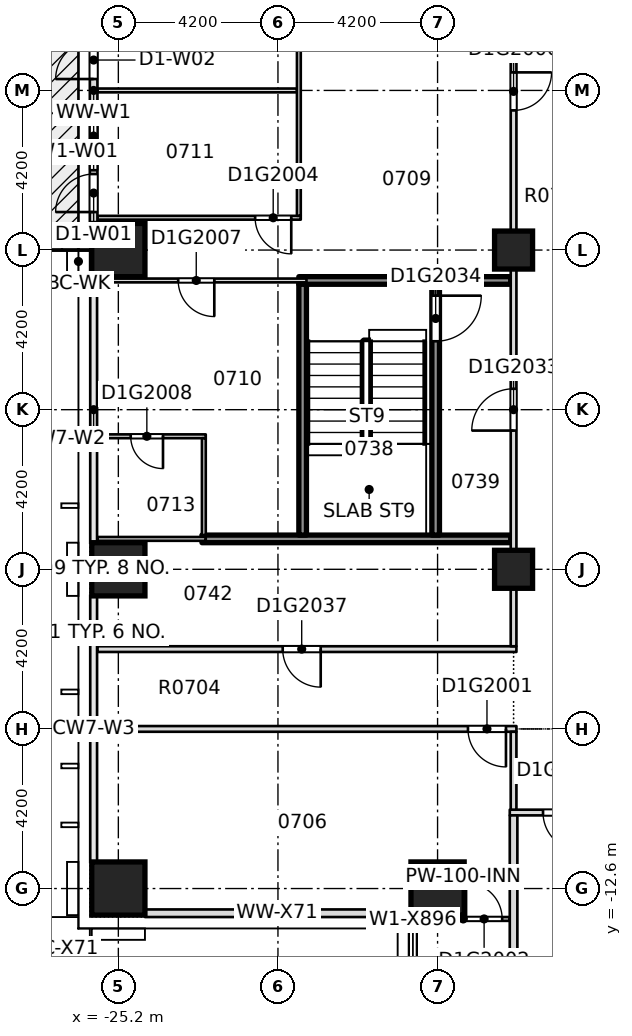
"""IFC4 building model, lengths in metres.
Left out: names, types, materials, properties, quantities, classifications, styles, units other than length and angle.
Written with IfcOpenShell. Run it as: python <this file> out.ifc"""

import sys

from ifc_helpers import new_model, si_unit, direction, frame, frame_2d, origin, origin_2d, place, context, subcontext, project, spatial, rectangle, extrude, element, fill, save


model = new_model("IFC4")
c1 = context("Model", 3, precision=1e-05, world=origin(), true_north=direction((0.0, 1.0)))
c2 = subcontext(c1, "Body", "Model", "MODEL_VIEW")
j1 = project(units=[si_unit("LENGTHUNIT", "METRE"), si_unit("PLANEANGLEUNIT", "RADIAN")], contexts=[c1])
p1 = place(None, origin())
s1 = spatial("IfcSite", under=j1, at=p1, CompositionType="ELEMENT")
p2 = place(p1, origin())
s2 = spatial("IfcBuilding", under=s1, at=p2, CompositionType="ELEMENT")
p3 = place(p2, frame((0.0, 0.0, 37.95)))
s3 = spatial("IfcBuildingStorey", under=s2, at=p3, CompositionType="ELEMENT", Elevation=37.95)
for number, where, z_axis, x_axis in (
    (1, (-25.2, -12.6, -0.32), (0.0, 0.0, 1.0), (1.0, 0.0, 0.0)),
    (2, (-16.8, -12.6, -0.32), (0.0, 0.0, 1.0), (1.0, 0.0, 0.0)),
    (3, (-25.2, -4.2, -0.32), (0.0, 0.0, 1.0), (1.0, 0.0, 0.0)),
    (4, (-25.2, 4.2, -0.32), (0.0, 0.0, 1.0), (1.0, 0.0, 0.0)),
):
    element("IfcColumn", number, at=place(p3, frame(where, z_axis=z_axis, x_axis=x_axis)), inside=s3, PredefinedType="COLUMN", context=c2, shape_type="SweptSolid", body=[
        extrude(rectangle(XDim=1.4, YDim=1.4, at=origin_2d()), origin(), (0.0, 0.0, 1.0), 3.45),
    ])
for number, where, z_axis, x_axis in (
    (5, (-14.8, -4.2, -0.32), (0.0, 0.0, 1.0), (1.0, 0.0, 0.0)),
    (6, (-14.8, 4.2, -0.32), (0.0, 0.0, 1.0), (1.0, 0.0, 0.0)),
):
    element("IfcColumn", number, at=place(p3, frame(where, z_axis=z_axis, x_axis=x_axis)), inside=s3, PredefinedType="COLUMN", context=c2, shape_type="SweptSolid", body=[
        extrude(rectangle(XDim=1.0, YDim=1.0, at=origin_2d()), origin(), (0.0, 0.0, 1.0), 3.45),
    ])
p4 = place(p3, frame((-17.35, -13.4, 0.0), z_axis=(0.0, 0.0, 1.0), x_axis=(1.0, 0.0, 0.0)))
e7 = element("IfcWall", 7, at=p4, inside=s3, PredefinedType="PARTITIONING", context=c2, shape_type="SweptSolid", body=[
    extrude(rectangle(XDim=2.45, YDim=0.1, at=frame_2d((1.225, 0.0))), origin(), (0.0, 0.0, 1.0), 3.13),
])
p5 = place(p4, frame((1.3, 0.0, 0.0)))
e8 = element("IfcOpeningElement", 8, at=p5, cuts=e7, PredefinedType="OPENING", context=c2, shape_type="SweptSolid", body=[
    extrude(rectangle(XDim=0.95, YDim=2.1, at=frame_2d((0.475, 1.05))), frame((0.0, 0.06, 0.0), z_axis=(0.0, -1.0, 0.0), x_axis=(1.0, 0.0, 0.0)), (0.0, 0.0, 1.0), 0.12),
])
p6 = place(p3, frame((-14.9, -10.6, 0.0), z_axis=(0.0, 0.0, 1.0), x_axis=(1.0, 0.0, 0.0)))
e9 = element("IfcWall", 9, at=p6, inside=s3, PredefinedType="PARTITIONING", context=c2, shape_type="SweptSolid", body=[
    extrude(rectangle(XDim=6.4, YDim=0.15, at=frame_2d((3.2, 0.0))), origin(), (0.0, 0.0, 1.0), 3.13),
])
p7 = place(p6, frame((3.95, 0.0, 0.0)))
e10 = element("IfcOpeningElement", 10, at=p7, cuts=e9, PredefinedType="OPENING", context=c2, shape_type="SweptSolid", body=[
    extrude(rectangle(XDim=1.1, YDim=2.1, at=frame_2d((0.55, 1.05))), frame((0.0, 0.085, 0.0), z_axis=(0.0, -1.0, 0.0), x_axis=(1.0, 0.0, 0.0)), (0.0, 0.0, 1.0), 0.17),
])
p8 = place(p6, frame((0.875, 0.0, 0.0)))
e11 = element("IfcOpeningElement", 11, at=p8, cuts=e9, PredefinedType="OPENING", context=c2, shape_type="SweptSolid", body=[
    extrude(rectangle(XDim=1.0, YDim=2.1, at=frame_2d((0.5, 1.05))), frame((0.0, 0.085, 0.0), z_axis=(0.0, -1.0, 0.0), x_axis=(1.0, 0.0, 0.0)), (0.0, 0.0, 1.0), 0.17),
])
p9 = place(p3, frame((-25.75, -8.4, 0.0), z_axis=(0.0, 0.0, 1.0), x_axis=(1.0, 0.0, 0.0)))
e12 = element("IfcWall", 12, at=p9, inside=s3, PredefinedType="PARTITIONING", context=c2, shape_type="SweptSolid", body=[
    extrude(rectangle(XDim=11.025, YDim=0.15, at=frame_2d((5.512, 0.0))), origin(), (0.0, 0.0, 1.0), 3.13),
])
p10 = place(p9, frame((9.75, 0.0, 0.0)))
e13 = element("IfcOpeningElement", 13, at=p10, cuts=e12, PredefinedType="OPENING", context=c2, shape_type="SweptSolid", body=[
    extrude(rectangle(XDim=1.0, YDim=2.1, at=frame_2d((0.5, 1.05))), frame((0.0, 0.085, 0.0), z_axis=(0.0, -1.0, 0.0), x_axis=(1.0, 0.0, 0.0)), (0.0, 0.0, 1.0), 0.17),
])
p11 = place(p3, frame((-25.75, -6.3, 0.0), z_axis=(0.0, 0.0, 1.0), x_axis=(1.0, 0.0, 0.0)))
e14 = element("IfcWall", 14, at=p11, inside=s3, PredefinedType="PARTITIONING", context=c2, shape_type="SweptSolid", body=[
    extrude(rectangle(XDim=11.025, YDim=0.15, at=frame_2d((5.512, 0.0))), origin(), (0.0, 0.0, 1.0), 3.13),
])
p12 = place(p11, frame((4.875, 0.0, 0.0)))
e15 = element("IfcOpeningElement", 15, at=p12, cuts=e14, PredefinedType="OPENING", context=c2, shape_type="SweptSolid", body=[
    extrude(rectangle(XDim=1.0, YDim=2.1, at=frame_2d((0.5, 1.05))), frame((0.0, 0.085, 0.0), z_axis=(0.0, -1.0, 0.0), x_axis=(1.0, 0.0, 0.0)), (0.0, 0.0, 1.0), 0.17),
])
p13 = place(p3, frame((-25.75, -3.4, 0.0), z_axis=(0.0, 0.0, 1.0), x_axis=(1.0, 0.0, 0.0)))
e16 = element("IfcWall", 16, at=p13, inside=s3, PredefinedType="PARTITIONING", context=c2, shape_type="SweptSolid", body=[
    extrude(rectangle(XDim=2.85, YDim=0.1, at=frame_2d((1.425, 0.0))), origin(), (0.0, 0.0, 1.0), 3.13),
])
p14 = place(p3, frame((-23.0, -3.4, 0.0), z_axis=(0.0, 0.0, 1.0), x_axis=(1.0, 0.0, 0.0)))
e17 = element("IfcWall", 17, at=p14, inside=s3, PredefinedType="SOLIDWALL", context=c2, shape_type="SweptSolid", body=[
    extrude(rectangle(XDim=8.125, YDim=0.2, at=frame_2d((4.062, 0.0))), origin(), (0.0, 0.0, 1.0), 3.13),
])
p15 = place(p3, frame((-25.75, -0.7, 0.0), z_axis=(0.0, 0.0, 1.0), x_axis=(1.0, 0.0, 0.0)))
e18 = element("IfcWall", 18, at=p15, inside=s3, PredefinedType="PARTITIONING", context=c2, shape_type="SweptSolid", body=[
    extrude(rectangle(XDim=2.85, YDim=0.1, at=frame_2d((1.425, 0.0))), origin(), (0.0, 0.0, 1.0), 3.13),
])
p16 = place(p15, frame((0.875, 0.0, 0.0)))
e19 = element("IfcOpeningElement", 19, at=p16, cuts=e18, PredefinedType="OPENING", context=c2, shape_type="SweptSolid", body=[
    extrude(rectangle(XDim=0.85, YDim=2.1, at=frame_2d((0.425, 1.05))), frame((0.0, 0.06, 0.0), z_axis=(0.0, -1.0, 0.0), x_axis=(1.0, 0.0, 0.0)), (0.0, 0.0, 1.0), 0.12),
])
p17 = place(p3, frame((-25.75, 3.4, 0.0), z_axis=(0.0, 0.0, 1.0), x_axis=(1.0, 0.0, 0.0)))
e20 = element("IfcWall", 20, at=p17, inside=s3, PredefinedType="PARTITIONING", context=c2, shape_type="SweptSolid", body=[
    extrude(rectangle(XDim=5.5, YDim=0.1, at=frame_2d((2.75, 0.0))), origin(), (0.0, 0.0, 1.0), 3.13),
])
p18 = place(p17, frame((2.125, 0.0, 0.0)))
e21 = element("IfcOpeningElement", 21, at=p18, cuts=e20, PredefinedType="OPENING", context=c2, shape_type="SweptSolid", body=[
    extrude(rectangle(XDim=0.95, YDim=2.1, at=frame_2d((0.475, 1.05))), frame((0.0, 0.06, 0.0), z_axis=(0.0, -1.0, 0.0), x_axis=(1.0, 0.0, 0.0)), (0.0, 0.0, 1.0), 0.12),
])
p19 = place(p3, frame((-20.45, 3.4, 0.0), z_axis=(0.0, 0.0, 1.0), x_axis=(1.0, 0.0, 0.0)))
e22 = element("IfcWall", 22, at=p19, inside=s3, PredefinedType="SOLIDWALL", context=c2, shape_type="SweptSolid", body=[
    extrude(rectangle(XDim=5.575, YDim=0.2, at=frame_2d((2.788, 0.0))), origin(), (0.0, 0.0, 1.0), 3.13),
])
p20 = place(p3, frame((-25.75, 5.05, 0.0), z_axis=(0.0, 0.0, 1.0), x_axis=(1.0, 0.0, 0.0)))
e23 = element("IfcWall", 23, at=p20, inside=s3, PredefinedType="PARTITIONING", context=c2, shape_type="SweptSolid", body=[
    extrude(rectangle(XDim=5.35, YDim=0.1, at=frame_2d((2.675, 0.0))), origin(), (0.0, 0.0, 1.0), 3.13),
])
p21 = place(p20, frame((4.15, 0.0, 0.0)))
e24 = element("IfcOpeningElement", 24, at=p21, cuts=e23, PredefinedType="OPENING", context=c2, shape_type="SweptSolid", body=[
    extrude(rectangle(XDim=0.95, YDim=2.1, at=frame_2d((0.475, 1.05))), frame((0.0, 0.06, 0.0), z_axis=(0.0, -1.0, 0.0), x_axis=(1.0, 0.0, 0.0)), (0.0, 0.0, 1.0), 0.12),
])
p22 = place(p3, frame((-25.75, 8.4, 0.0), z_axis=(0.0, 0.0, 1.0), x_axis=(1.0, 0.0, 0.0)))
e25 = element("IfcWall", 25, at=p22, inside=s3, PredefinedType="PARTITIONING", context=c2, shape_type="SweptSolid", body=[
    extrude(rectangle(XDim=5.25, YDim=0.1, at=frame_2d((2.625, 0.0))), origin(), (0.0, 0.0, 1.0), 3.13),
])
p23 = place(p3, frame((-22.95, -3.3, 0.0), z_axis=(0.0, 0.0, 1.0), x_axis=(0.0, 1.0, 0.0)))
e26 = element("IfcWall", 26, at=p23, inside=s3, PredefinedType="PARTITIONING", context=c2, shape_type="SweptSolid", body=[
    extrude(rectangle(XDim=2.55, YDim=0.1, at=frame_2d((1.275, 0.0))), origin(), (0.0, 0.0, 1.0), 3.13),
])
p24 = place(p3, frame((-20.45, 5.1, 0.0), z_axis=(0.0, 0.0, 1.0), x_axis=(0.0, 1.0, 0.0)))
e27 = element("IfcWall", 27, at=p24, inside=s3, PredefinedType="PARTITIONING", context=c2, shape_type="SweptSolid", body=[
    extrude(rectangle(XDim=8.05, YDim=0.1, at=frame_2d((4.025, 0.0))), origin(), (0.0, 0.0, 1.0), 3.13),
])
p25 = place(p24, frame((4.6, 0.0, 0.0)))
e28 = element("IfcOpeningElement", 28, at=p25, cuts=e27, PredefinedType="OPENING", context=c2, shape_type="SweptSolid", body=[
    extrude(rectangle(XDim=0.95, YDim=2.1, at=frame_2d((0.475, 1.05))), frame((0.0, 0.06, 0.0), z_axis=(0.0, -1.0, 0.0), x_axis=(1.0, 0.0, 0.0)), (0.0, 0.0, 1.0), 0.12),
])
p26 = place(p3, frame((-16.85, -3.3, 0.0), z_axis=(0.0, 0.0, 1.0), x_axis=(0.0, 1.0, 0.0)))
e29 = element("IfcWall", 29, at=p26, inside=s3, PredefinedType="SOLIDWALL", context=c2, shape_type="SweptSolid", body=[
    extrude(rectangle(XDim=6.6, YDim=0.2, at=frame_2d((3.3, 0.0))), origin(), (0.0, 0.0, 1.0), 3.13),
])
p27 = place(p26, frame((5.1, 0.0, 0.0)))
e30 = element("IfcOpeningElement", 30, at=p27, cuts=e29, PredefinedType="OPENING", context=c2, shape_type="SweptSolid", body=[
    extrude(rectangle(XDim=1.2, YDim=2.1, at=frame_2d((0.6, 1.05))), frame((0.0, 0.11, 0.0), z_axis=(0.0, -1.0, 0.0), x_axis=(1.0, 0.0, 0.0)), (0.0, 0.0, 1.0), 0.22),
])
p28 = place(p3, frame((-14.8, -18.7, 0.0), z_axis=(0.0, 0.0, 1.0), x_axis=(0.0, 1.0, 0.0)))
e31 = element("IfcWall", 31, at=p28, inside=s3, PredefinedType="PARTITIONING", context=c2, shape_type="SweptSolid", body=[
    extrude(rectangle(XDim=8.025, YDim=0.2, at=frame_2d((4.012, 0.0))), origin(), (0.0, 0.0, 1.0), 3.13),
])
p29 = place(p3, frame((-14.8, -10.525, 0.0), z_axis=(0.0, 0.0, 1.0), x_axis=(0.0, 1.0, 0.0)))
e32 = element("IfcWall", 32, at=p29, inside=s3, PredefinedType="PARTITIONING", context=c2, shape_type="SweptSolid", body=[
    extrude(rectangle(XDim=2.05, YDim=0.15, at=frame_2d((1.025, 0.0))), origin(), (0.0, 0.0, 1.0), 3.13),
])
p30 = place(p3, frame((-14.8, -6.225, 0.0), z_axis=(0.0, 0.0, 1.0), x_axis=(0.0, 1.0, 0.0)))
e33 = element("IfcWall", 33, at=p30, inside=s3, PredefinedType="PARTITIONING", context=c2, shape_type="SweptSolid", body=[
    extrude(rectangle(XDim=27.775, YDim=0.15, at=frame_2d((13.888, 0.0))), origin(), (0.0, 0.0, 1.0), 3.13),
])
p31 = place(p30, frame((14.1, 0.0, 0.0)))
e34 = element("IfcOpeningElement", 34, at=p31, cuts=e33, PredefinedType="OPENING", context=c2, shape_type="SweptSolid", body=[
    extrude(rectangle(XDim=1.0, YDim=2.1, at=frame_2d((0.5, 1.05))), frame((0.0, 0.085, 0.0), z_axis=(0.0, -1.0, 0.0), x_axis=(1.0, 0.0, 0.0)), (0.0, 0.0, 1.0), 0.17),
])
p32 = place(p30, frame((21.175, 0.0, 0.0)))
e35 = element("IfcOpeningElement", 35, at=p32, cuts=e33, PredefinedType="OPENING", context=c2, shape_type="SweptSolid", body=[
    extrude(rectangle(XDim=0.95, YDim=2.1, at=frame_2d((0.475, 1.05))), frame((0.0, 0.085, 0.0), z_axis=(0.0, -1.0, 0.0), x_axis=(1.0, 0.0, 0.0)), (0.0, 0.0, 1.0), 0.17),
])
p33 = place(p30, frame((25.075, 0.0, 0.0)))
e36 = element("IfcOpeningElement", 36, at=p33, cuts=e33, PredefinedType="OPENING", context=c2, shape_type="SweptSolid", body=[
    extrude(rectangle(XDim=0.95, YDim=2.1, at=frame_2d((0.475, 1.05))), frame((0.0, 0.085, 0.0), z_axis=(0.0, -1.0, 0.0), x_axis=(1.0, 0.0, 0.0)), (0.0, 0.0, 1.0), 0.17),
])
p34 = place(p30, frame((5.675, 0.0, 0.0)))
e37 = element("IfcOpeningElement", 37, at=p34, cuts=e33, PredefinedType="OPENING", context=c2, shape_type="SweptSolid", body=[
    extrude(rectangle(XDim=1.1, YDim=2.1, at=frame_2d((0.55, 1.05))), frame((0.0, 0.085, 0.0), z_axis=(0.0, -1.0, 0.0), x_axis=(1.0, 0.0, 0.0)), (0.0, 0.0, 1.0), 0.17),
])
p35 = place(p3, frame((-25.85, 11.9, 0.0), z_axis=(0.0, 0.0, 1.0), x_axis=(0.0, -1.0, 0.0)))
e38 = element("IfcWall", 38, at=p35, inside=s3, PredefinedType="STANDARD", context=c2, shape_type="SweptSolid", body=[
    extrude(rectangle(XDim=7.0, YDim=0.2, at=frame_2d((3.5, 0.0))), origin(), (0.0, 0.0, 1.0), 3.13),
])
p36 = place(p35, frame((3.8, 0.0, 0.2)))
e39 = element("IfcOpeningElement", 39, at=p36, cuts=e38, PredefinedType="OPENING", context=c2, shape_type="SweptSolid", body=[
    extrude(rectangle(XDim=1.8, YDim=2.65, at=frame_2d((0.9, 1.325))), frame((0.0, 0.11, 0.0), z_axis=(0.0, -1.0, 0.0), x_axis=(1.0, 0.0, 0.0)), (0.0, 0.0, 1.0), 0.22),
])
p37 = place(p35, frame((5.7, 0.0, 0.0)))
e40 = element("IfcOpeningElement", 40, at=p37, cuts=e38, PredefinedType="OPENING", context=c2, shape_type="SweptSolid", body=[
    extrude(rectangle(XDim=1.0, YDim=2.4, at=frame_2d((0.5, 1.2))), frame((0.0, 0.11, 0.0), z_axis=(0.0, -1.0, 0.0), x_axis=(1.0, 0.0, 0.0)), (0.0, 0.0, 1.0), 0.22),
])
p38 = place(p35, frame((0.3, 0.0, 0.2)))
e41 = element("IfcOpeningElement", 41, at=p38, cuts=e38, PredefinedType="OPENING", context=c2, shape_type="SweptSolid", body=[
    extrude(rectangle(XDim=1.8, YDim=2.65, at=frame_2d((0.9, 1.325))), frame((0.0, 0.11, 0.0), z_axis=(0.0, -1.0, 0.0), x_axis=(1.0, 0.0, 0.0)), (0.0, 0.0, 1.0), 0.22),
])
p39 = place(p35, frame((2.2, 0.0, 0.0)))
e42 = element("IfcOpeningElement", 42, at=p39, cuts=e38, PredefinedType="OPENING", context=c2, shape_type="SweptSolid", body=[
    extrude(rectangle(XDim=1.0, YDim=2.4, at=frame_2d((0.5, 1.2))), frame((0.0, 0.11, 0.0), z_axis=(0.0, -1.0, 0.0), x_axis=(1.0, 0.0, 0.0)), (0.0, 0.0, 1.0), 0.22),
])
p40 = place(p3, frame((-24.5, -13.25, 0.0), z_axis=(0.0, 0.0, 1.0), x_axis=(1.0, 0.0, 0.0)))
e43 = element("IfcWall", 43, at=p40, inside=s3, PredefinedType="STANDARD", context=c2, shape_type="SweptSolid", body=[
    extrude(rectangle(XDim=6.95, YDim=0.2, at=frame_2d((3.475, 0.0))), origin(), (0.0, 0.0, 1.0), 3.13),
])
p41 = place(p3, frame((-17.45, -13.35, 0.0), z_axis=(0.0, 0.0, 1.0), x_axis=(0.0, -1.0, 0.0)))
e44 = element("IfcWall", 44, at=p41, inside=s3, PredefinedType="STANDARD", context=c2, shape_type="SweptSolid", body=[
    extrude(rectangle(XDim=6.95, YDim=0.2, at=frame_2d((3.475, 0.0))), origin(), (0.0, 0.0, 1.0), 3.13),
])
p42 = place(p41, frame((3.42, 0.0, 0.2)))
e45 = element("IfcOpeningElement", 45, at=p42, cuts=e44, PredefinedType="OPENING", context=c2, shape_type="SweptSolid", body=[
    extrude(rectangle(XDim=1.8, YDim=2.65, at=frame_2d((0.9, 1.325))), frame((0.0, 0.11, 0.0), z_axis=(0.0, -1.0, 0.0), x_axis=(1.0, 0.0, 0.0)), (0.0, 0.0, 1.0), 0.22),
])
p43 = place(p41, frame((0.275, 0.0, 0.2)))
e46 = element("IfcOpeningElement", 46, at=p43, cuts=e44, PredefinedType="OPENING", context=c2, shape_type="SweptSolid", body=[
    extrude(rectangle(XDim=1.8, YDim=2.65, at=frame_2d((0.9, 1.325))), frame((0.0, 0.11, 0.0), z_axis=(0.0, -1.0, 0.0), x_axis=(1.0, 0.0, 0.0)), (0.0, 0.0, 1.0), 0.22),
])
p44 = place(p3, frame((-20.35, -3.3, 0.0), z_axis=(0.0, 0.0, 1.0), x_axis=(0.0, 1.0, 0.0)))
e47 = element("IfcWall", 47, at=p44, inside=s3, PredefinedType="SOLIDWALL", context=c2, shape_type="SweptSolid", body=[
    extrude(rectangle(XDim=6.6, YDim=0.2, at=frame_2d((3.3, 0.0))), origin(), (0.0, 0.0, 1.0), 3.13),
])
p45 = place(p10, origin())
e48 = element("IfcDoor", 48, at=p45, inside=s3, OperationType="SINGLE_SWING_RIGHT", PredefinedType="DOOR", context=c2, shape_type="SweptSolid", body=[
    extrude(rectangle(XDim=1.0, YDim=2.1, at=frame_2d((0.5, 1.05))), frame((0.0, 0.025, 0.0), z_axis=(0.0, -1.0, 0.0), x_axis=(1.0, 0.0, 0.0)), (0.0, 0.0, 1.0), 0.05),
])
fill(e13, e48)
p46 = place(p5, origin())
e49 = element("IfcDoor", 49, at=p46, inside=s3, OperationType="SINGLE_SWING_RIGHT", PredefinedType="DOOR", context=c2, shape_type="SweptSolid", body=[
    extrude(rectangle(XDim=0.95, YDim=2.1, at=frame_2d((0.475, 1.05))), frame((0.0, 0.025, 0.0), z_axis=(0.0, -1.0, 0.0), x_axis=(1.0, 0.0, 0.0)), (0.0, 0.0, 1.0), 0.05),
])
fill(e8, e49)
p47 = place(p21, origin())
e50 = element("IfcDoor", 50, at=p47, inside=s3, OperationType="SINGLE_SWING_LEFT", PredefinedType="DOOR", context=c2, shape_type="SweptSolid", body=[
    extrude(rectangle(XDim=0.95, YDim=2.1, at=frame_2d((0.475, 1.05))), frame((0.0, 0.025, 0.0), z_axis=(0.0, -1.0, 0.0), x_axis=(1.0, 0.0, 0.0)), (0.0, 0.0, 1.0), 0.05),
])
fill(e24, e50)
p48 = place(p31, origin())
e51 = element("IfcDoor", 51, at=p48, inside=s3, OperationType="SINGLE_SWING_LEFT", PredefinedType="DOOR", context=c2, shape_type="SweptSolid", body=[
    extrude(rectangle(XDim=1.0, YDim=2.1, at=frame_2d((0.5, 1.05))), frame((0.0, 0.025, 0.0), z_axis=(0.0, -1.0, 0.0), x_axis=(1.0, 0.0, 0.0)), (0.0, 0.0, 1.0), 0.05),
])
fill(e34, e51)
p49 = place(p18, origin())
e52 = element("IfcDoor", 52, at=p49, inside=s3, OperationType="SINGLE_SWING_LEFT", PredefinedType="DOOR", context=c2, shape_type="SweptSolid", body=[
    extrude(rectangle(XDim=0.95, YDim=2.1, at=frame_2d((0.475, 1.05))), frame((0.0, 0.025, 0.0), z_axis=(0.0, -1.0, 0.0), x_axis=(1.0, 0.0, 0.0)), (0.0, 0.0, 1.0), 0.05),
])
fill(e21, e52)
p50 = place(p16, origin())
e53 = element("IfcDoor", 53, at=p50, inside=s3, OperationType="SINGLE_SWING_RIGHT", PredefinedType="DOOR", context=c2, shape_type="SweptSolid", body=[
    extrude(rectangle(XDim=0.85, YDim=2.1, at=frame_2d((0.425, 1.05))), frame((0.0, 0.025, 0.0), z_axis=(0.0, -1.0, 0.0), x_axis=(1.0, 0.0, 0.0)), (0.0, 0.0, 1.0), 0.05),
])
fill(e19, e53)
p51 = place(p34, origin())
e54 = element("IfcDoor", 54, at=p51, inside=s3, OperationType="SINGLE_SWING_RIGHT", PredefinedType="DOOR", context=c2, shape_type="SweptSolid", body=[
    extrude(rectangle(XDim=1.1, YDim=2.1, at=frame_2d((0.55, 1.05))), frame((0.0, 0.025, 0.0), z_axis=(0.0, -1.0, 0.0), x_axis=(1.0, 0.0, 0.0)), (0.0, 0.0, 1.0), 0.05),
])
fill(e37, e54)
p52 = place(p27, origin())
e55 = element("IfcDoor", 55, at=p52, inside=s3, OperationType="SINGLE_SWING_RIGHT", PredefinedType="DOOR", context=c2, shape_type="SweptSolid", body=[
    extrude(rectangle(XDim=1.2, YDim=2.1, at=frame_2d((0.6, 1.05))), frame((0.0, 0.025, 0.0), z_axis=(0.0, -1.0, 0.0), x_axis=(1.0, 0.0, 0.0)), (0.0, 0.0, 1.0), 0.05),
])
fill(e30, e55)
p53 = place(p8, origin())
e56 = element("IfcDoor", 56, at=p53, inside=s3, OperationType="SINGLE_SWING_RIGHT", PredefinedType="DOOR", context=c2, shape_type="SweptSolid", body=[
    extrude(rectangle(XDim=1.0, YDim=2.1, at=frame_2d((0.5, 1.05))), frame((0.0, 0.025, 0.0), z_axis=(0.0, -1.0, 0.0), x_axis=(1.0, 0.0, 0.0)), (0.0, 0.0, 1.0), 0.05),
])
fill(e11, e56)
p54 = place(p12, origin())
e57 = element("IfcDoor", 57, at=p54, inside=s3, OperationType="SINGLE_SWING_RIGHT", PredefinedType="DOOR", context=c2, shape_type="SweptSolid", body=[
    extrude(rectangle(XDim=1.0, YDim=2.1, at=frame_2d((0.5, 1.05))), frame((0.0, 0.025, 0.0), z_axis=(0.0, -1.0, 0.0), x_axis=(1.0, 0.0, 0.0)), (0.0, 0.0, 1.0), 0.05),
])
fill(e15, e57)
p55 = place(p36, origin())
e58 = element("IfcWindow", 58, at=p55, inside=s3, PartitioningType="SINGLE_PANEL", PredefinedType="WINDOW", context=c2, shape_type="SweptSolid", body=[
    extrude(rectangle(XDim=1.8, YDim=2.65, at=frame_2d((0.9, 1.325))), frame((0.0, 0.03, 0.0), z_axis=(0.0, -1.0, 0.0), x_axis=(1.0, 0.0, 0.0)), (0.0, 0.0, 1.0), 0.06),
])
fill(e39, e58)
p56 = place(p37, origin())
e59 = element("IfcDoor", 59, at=p56, inside=s3, OperationType="SINGLE_SWING_LEFT", PredefinedType="DOOR", context=c2, shape_type="SweptSolid", body=[
    extrude(rectangle(XDim=1.0, YDim=2.4, at=frame_2d((0.5, 1.2))), frame((0.0, 0.025, 0.0), z_axis=(0.0, -1.0, 0.0), x_axis=(1.0, 0.0, 0.0)), (0.0, 0.0, 1.0), 0.05),
])
fill(e40, e59)
p57 = place(p39, origin())
e60 = element("IfcDoor", 60, at=p57, inside=s3, OperationType="SINGLE_SWING_LEFT", PredefinedType="DOOR", context=c2, shape_type="SweptSolid", body=[
    extrude(rectangle(XDim=1.0, YDim=2.4, at=frame_2d((0.5, 1.2))), frame((0.0, 0.025, 0.0), z_axis=(0.0, -1.0, 0.0), x_axis=(1.0, 0.0, 0.0)), (0.0, 0.0, 1.0), 0.05),
])
fill(e42, e60)
p58 = place(p43, origin())
e61 = element("IfcWindow", 61, at=p58, inside=s3, PartitioningType="SINGLE_PANEL", PredefinedType="WINDOW", context=c2, shape_type="SweptSolid", body=[
    extrude(rectangle(XDim=1.8, YDim=2.65, at=frame_2d((0.9, 1.325))), frame((0.0, 0.03, 0.0), z_axis=(0.0, -1.0, 0.0), x_axis=(1.0, 0.0, 0.0)), (0.0, 0.0, 1.0), 0.06),
])
fill(e46, e61)
save(model, sys.argv[1])
